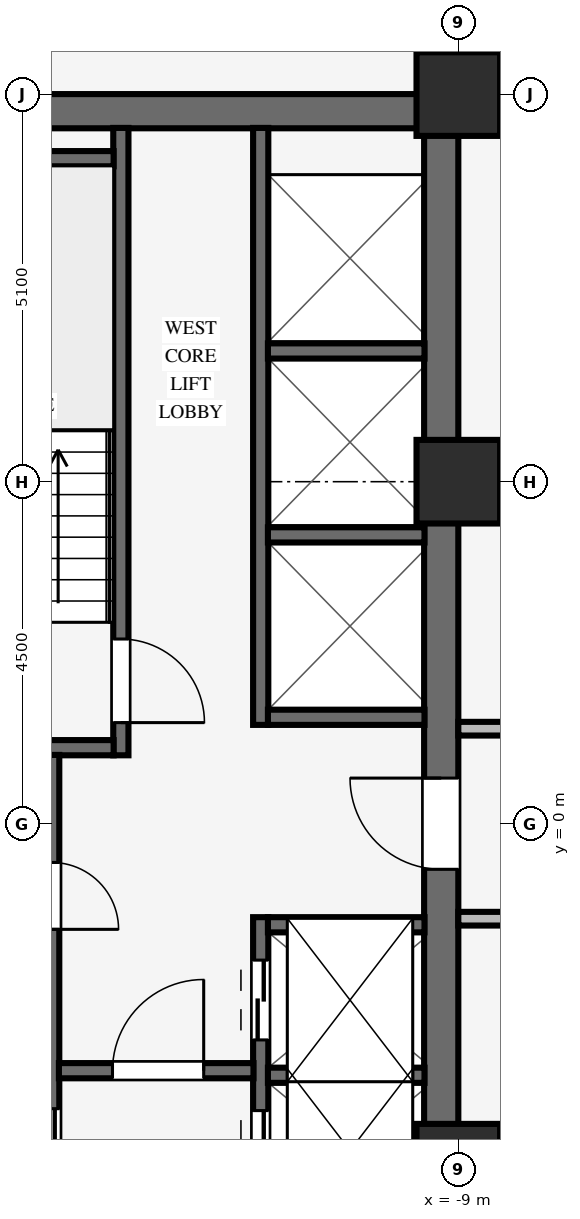
"""IFC4 building model, lengths in metres.
Left out: names, types, materials, properties, quantities, classifications, styles, units other than length and angle.
Written with IfcOpenShell. Run it as: python <this file> out.ifc"""

import sys

from ifc_helpers import new_model, si_unit, direction, frame, frame_2d, origin, origin_2d, place, context, subcontext, project, spatial, rectangle, extrude, source, transform, mapped, element, fill, save


model = new_model("IFC4")
c1 = context("Model", 3, precision=1e-05, world=origin(), true_north=direction((0.0, 1.0)))
c2 = subcontext(c1, "Body", "Model", "MODEL_VIEW")
j1 = project(units=[si_unit("LENGTHUNIT", "METRE"), si_unit("PLANEANGLEUNIT", "RADIAN")], contexts=[c1])
p1 = place(None, origin())
s1 = spatial("IfcSite", under=j1, at=p1, CompositionType="ELEMENT")
p2 = place(p1, origin())
s2 = spatial("IfcBuilding", under=s1, at=p2, CompositionType="ELEMENT")
p3 = place(p2, frame((0.0, 0.0, 86.0)))
s3 = spatial("IfcBuildingStorey", under=s2, at=p3, CompositionType="ELEMENT", Elevation=86.0)
p4 = place(p3, frame((-17.5, 9.375, 0.0), z_axis=(0.0, 0.0, 1.0), x_axis=(1.0, 0.0, 0.0)))
e1 = element("IfcWall", 1, at=p4, inside=s3, PredefinedType="SHEAR", context=c2, shape_type="SweptSolid", body=[
    extrude(rectangle(XDim=8.5, YDim=0.45, at=frame_2d((4.25, 0.0))), origin(), (0.0, 0.0, 1.0), 3.37),
])
p5 = place(p3, frame((-9.225, -9.155, 0.0), z_axis=(0.0, 0.0, 1.0), x_axis=(0.0, 1.0, 0.0)))
e2 = element("IfcWall", 2, at=p5, inside=s3, PredefinedType="SHEAR", context=c2, shape_type="SweptSolid", body=[
    extrude(rectangle(XDim=18.31, YDim=0.45, at=frame_2d((9.155, 0.0))), origin(), (0.0, 0.0, 1.0), 3.37),
])
p6 = place(p5, frame((8.555, 0.0, 0.0)))
e3 = element("IfcOpeningElement", 3, at=p6, cuts=e2, PredefinedType="OPENING", context=c2, shape_type="SweptSolid", body=[
    extrude(rectangle(XDim=1.2, YDim=2.15, at=frame_2d((0.6, 1.075))), frame((0.0, 0.235, 0.0), z_axis=(0.0, -1.0, 0.0), x_axis=(1.0, 0.0, 0.0)), (0.0, 0.0, 1.0), 0.47),
])
for number, where, z_axis, x_axis in (
    (4, (-9.0, -4.5, 0.0), (0.0, 0.0, 1.0), (1.0, 0.0, 0.0)),
    (5, (-9.0, 4.5, 0.0), (0.0, 0.0, 1.0), (1.0, 0.0, 0.0)),
    (6, (-9.0, 9.6, 0.0), (0.0, 0.0, 1.0), (1.0, 0.0, 0.0)),
):
    element("IfcColumn", number, at=place(p3, frame(where, z_axis=z_axis, x_axis=x_axis)), inside=s3, PredefinedType="COLUMN", context=c2, shape_type="SweptSolid", body=[
        extrude(rectangle(XDim=1.1, YDim=1.1, at=origin_2d()), origin(), (0.0, 0.0, 1.0), 3.37),
    ])
p7 = place(p3, frame((-13.44, 0.9, 0.0), z_axis=(0.0, 0.0, 1.0), x_axis=(0.0, 1.0, 0.0)))
e7 = element("IfcWall", 7, at=p7, inside=s3, PredefinedType="SHEAR", context=c2, shape_type="SweptSolid", body=[
    extrude(rectangle(XDim=8.255, YDim=0.2, at=frame_2d((4.127, 0.0))), origin(), (0.0, 0.0, 1.0), 3.37),
])
p8 = place(p7, frame((1.53, 0.0, 0.0), z_axis=(0.0, 0.0, 1.0), x_axis=(-1.0, 0.0, 0.0)))
e8 = element("IfcOpeningElement", 8, at=p8, cuts=e7, PredefinedType="OPENING", context=c2, shape_type="SweptSolid", body=[
    extrude(rectangle(XDim=1.1, YDim=2.15, at=frame_2d((0.55, 1.075))), frame((0.0, 0.11, 0.0), z_axis=(0.0, -1.0, 0.0), x_axis=(1.0, 0.0, 0.0)), (0.0, 0.0, 1.0), 0.22),
])
for number, where, z_axis, x_axis in (
    (9, (-17.055, 1.0, 0.0), (0.0, 0.0, 1.0), (1.0, 0.0, 0.0)),
    (10, (-17.055, 8.75, 0.0), (0.0, 0.0, 1.0), (1.0, 0.0, 0.0)),
):
    element("IfcWall", number, at=place(p3, frame(where, z_axis=z_axis, x_axis=x_axis)), inside=s3, PredefinedType="SHEAR", context=c2, shape_type="SweptSolid", body=[
        extrude(rectangle(XDim=3.52, YDim=0.2, at=frame_2d((1.76, 0.0))), origin(), (0.0, 0.0, 1.0), 3.37),
    ])
p9 = place(p3, frame((-14.35, -6.2, 0.0), z_axis=(0.0, 0.0, 1.0), x_axis=(0.0, 1.0, 0.0)))
e11 = element("IfcWall", 11, at=p9, inside=s3, PredefinedType="SHEAR", context=c2, shape_type="SweptSolid", body=[
    extrude(rectangle(XDim=7.105, YDim=0.2, at=frame_2d((3.552, 0.0))), origin(), (0.0, 0.0, 1.0), 3.37),
])
p10 = place(p9, frame((5.69, 0.0, 0.0), z_axis=(0.0, 0.0, 1.0), x_axis=(-1.0, 0.0, 0.0)))
e12 = element("IfcOpeningElement", 12, at=p10, cuts=e11, PredefinedType="OPENING", context=c2, shape_type="SweptSolid", body=[
    extrude(rectangle(XDim=0.88, YDim=2.1, at=frame_2d((0.44, 1.05))), frame((0.0, 0.11, 0.0), z_axis=(0.0, -1.0, 0.0), x_axis=(1.0, 0.0, 0.0)), (0.0, 0.0, 1.0), 0.22),
])
p11 = place(p9, frame((1.15, 0.0, 0.0)))
e13 = element("IfcOpeningElement", 13, at=p11, cuts=e11, PredefinedType="OPENING", context=c2, shape_type="SweptSolid", body=[
    extrude(rectangle(XDim=1.3, YDim=2.2, at=frame_2d((0.65, 1.1))), frame((0.0, 0.11, 0.0), z_axis=(0.0, -1.0, 0.0), x_axis=(1.0, 0.0, 0.0)), (0.0, 0.0, 1.0), 0.22),
])
p12 = place(p3, frame((-11.6, -9.155, 0.0), z_axis=(0.0, 0.0, 1.0), x_axis=(0.0, 1.0, 0.0)))
e14 = element("IfcWall", 14, at=p12, inside=s3, PredefinedType="SHEAR", context=c2, shape_type="SweptSolid", body=[
    extrude(rectangle(XDim=7.925, YDim=0.2, at=frame_2d((3.962, 0.0))), origin(), (0.0, 0.0, 1.0), 3.37),
])
p13 = place(p12, frame((0.37, 0.0, 0.0)))
e15 = element("IfcOpeningElement", 15, at=p13, cuts=e14, PredefinedType="OPENING", context=c2, shape_type="SweptSolid", body=[
    extrude(rectangle(XDim=1.05, YDim=2.15, at=frame_2d((0.525, 1.075))), frame((0.0, 0.11, 0.0), z_axis=(0.0, -1.0, 0.0), x_axis=(1.0, 0.0, 0.0)), (0.0, 0.0, 1.0), 0.22),
])
p14 = place(p12, frame((2.35, 0.0, 0.0)))
e16 = element("IfcOpeningElement", 16, at=p14, cuts=e14, PredefinedType="OPENING", context=c2, shape_type="SweptSolid", body=[
    extrude(rectangle(XDim=1.05, YDim=2.15, at=frame_2d((0.525, 1.075))), frame((0.0, 0.11, 0.0), z_axis=(0.0, -1.0, 0.0), x_axis=(1.0, 0.0, 0.0)), (0.0, 0.0, 1.0), 0.22),
])
p15 = place(p12, frame((4.33, 0.0, 0.0)))
e17 = element("IfcOpeningElement", 17, at=p15, cuts=e14, PredefinedType="OPENING", context=c2, shape_type="SweptSolid", body=[
    extrude(rectangle(XDim=1.05, YDim=2.15, at=frame_2d((0.525, 1.075))), frame((0.0, 0.11, 0.0), z_axis=(0.0, -1.0, 0.0), x_axis=(1.0, 0.0, 0.0)), (0.0, 0.0, 1.0), 0.22),
])
p16 = place(p12, frame((6.31, 0.0, 0.0)))
e18 = element("IfcOpeningElement", 18, at=p16, cuts=e14, PredefinedType="OPENING", context=c2, shape_type="SweptSolid", body=[
    extrude(rectangle(XDim=1.05, YDim=2.15, at=frame_2d((0.525, 1.075))), frame((0.0, 0.11, 0.0), z_axis=(0.0, -1.0, 0.0), x_axis=(1.0, 0.0, 0.0)), (0.0, 0.0, 1.0), 0.22),
])
p17 = place(p3, frame((-14.255, -3.25, 0.0), z_axis=(0.0, 0.0, 1.0), x_axis=(1.0, 0.0, 0.0)))
e19 = element("IfcWall", 19, at=p17, inside=s3, PredefinedType="SHEAR", context=c2, shape_type="SweptSolid", body=[
    extrude(rectangle(XDim=2.56, YDim=0.2, at=frame_2d((1.28, 0.0))), origin(), (0.0, 0.0, 1.0), 3.37),
])
p18 = place(p17, frame((0.705, 0.0, 0.0)))
e20 = element("IfcOpeningElement", 20, at=p18, cuts=e19, PredefinedType="OPENING", context=c2, shape_type="SweptSolid", body=[
    extrude(rectangle(XDim=1.2, YDim=2.15, at=frame_2d((0.6, 1.075))), frame((0.0, 0.11, 0.0), z_axis=(0.0, -1.0, 0.0), x_axis=(1.0, 0.0, 0.0)), (0.0, 0.0, 1.0), 0.22),
])
for number, where, z_axis, x_axis in (
    (21, (-11.505, -3.31, 0.0), (0.0, 0.0, 1.0), (1.0, 0.0, 0.0)),
    (22, (-11.505, -1.33, 0.0), (0.0, 0.0, 1.0), (1.0, 0.0, 0.0)),
):
    element("IfcWall", number, at=place(p3, frame(where, z_axis=z_axis, x_axis=x_axis)), inside=s3, PredefinedType="SHEAR", context=c2, shape_type="SweptSolid", body=[
        extrude(rectangle(XDim=2.06, YDim=0.2, at=frame_2d((1.03, 0.0))), origin(), (0.0, 0.0, 1.0), 3.37),
    ])
p19 = place(p3, frame((-11.6, 1.3, 0.0), z_axis=(0.0, 0.0, 1.0), x_axis=(0.0, 1.0, 0.0)))
e23 = element("IfcWall", 23, at=p19, inside=s3, PredefinedType="SHEAR", context=c2, shape_type="SweptSolid", body=[
    extrude(rectangle(XDim=7.855, YDim=0.2, at=frame_2d((3.927, 0.0))), origin(), (0.0, 0.0, 1.0), 3.37),
])
for number, where, z_axis, x_axis in (
    (24, (-11.505, 1.4, 0.0), (0.0, 0.0, 1.0), (1.0, 0.0, 0.0)),
    (25, (-11.505, 3.8, 0.0), (0.0, 0.0, 1.0), (1.0, 0.0, 0.0)),
    (26, (-11.505, 6.22, 0.0), (0.0, 0.0, 1.0), (1.0, 0.0, 0.0)),
):
    element("IfcWall", number, at=place(p3, frame(where, z_axis=z_axis, x_axis=x_axis)), inside=s3, PredefinedType="SHEAR", context=c2, shape_type="SweptSolid", body=[
        extrude(rectangle(XDim=2.06, YDim=0.2, at=frame_2d((1.03, 0.0))), origin(), (0.0, 0.0, 1.0), 3.37),
    ])
p20 = place(p3, frame((-9.0, -1.25, 0.0), z_axis=(0.0, 0.0, 1.0), x_axis=(1.0, 0.0, 0.0)))
e27 = element("IfcWall", 27, at=p20, inside=s3, PredefinedType="PARTITIONING", context=c2, shape_type="SweptSolid", body=[
    extrude(rectangle(XDim=5.8, YDim=0.18, at=frame_2d((2.9, 0.0))), origin(), (0.0, 0.0, 1.0), 3.36),
])
p21 = place(p20, frame((2.42, 0.0, 0.0)))
e28 = element("IfcOpeningElement", 28, at=p21, cuts=e27, PredefinedType="OPENING", context=c2, shape_type="SweptSolid", body=[
    extrude(rectangle(XDim=0.96, YDim=2.1, at=frame_2d((0.48, 1.05))), frame((0.0, 0.1, 0.0), z_axis=(0.0, -1.0, 0.0), x_axis=(1.0, 0.0, 0.0)), (0.0, 0.0, 1.0), 0.2),
])
p22 = place(p3, frame((-9.0, 1.25, 0.0), z_axis=(0.0, 0.0, 1.0), x_axis=(1.0, 0.0, 0.0)))
e29 = element("IfcWall", 29, at=p22, inside=s3, PredefinedType="PARTITIONING", context=c2, shape_type="SweptSolid", body=[
    extrude(rectangle(XDim=5.8, YDim=0.18, at=frame_2d((2.9, 0.0))), origin(), (0.0, 0.0, 1.0), 3.36),
])
p23 = place(p3, frame((-8.454, 9.6, 0.0), z_axis=(0.0, 0.0, 1.0), x_axis=(1.0, 0.0, 0.0)))
e30 = element("IfcWall", 30, at=p23, inside=s3, PredefinedType="PARTITIONING", context=c2, shape_type="SweptSolid", body=[
    extrude(rectangle(XDim=5.254, YDim=0.18, at=frame_2d((2.627, 0.0))), origin(), (0.0, 0.0, 1.0), 2.405),
])
m1 = source(origin(), c2, "Body", "SweptSolid", [
    extrude(rectangle(XDim=1.1, YDim=2.15, at=frame_2d((0.55, 1.075))), frame((0.0, 0.025, 0.0), z_axis=(0.0, -1.0, 0.0), x_axis=(1.0, 0.0, 0.0)), (0.0, 0.0, 1.0), 0.05),
])
p24 = place(p8, origin())
e31 = element("IfcDoor", 31, at=p24, inside=s3, OperationType="SINGLE_SWING_RIGHT", PredefinedType="DOOR", context=c2, shape_type="MappedRepresentation", body=[
    mapped(m1, transform((0.0, 0.0, 0.0), scale=1.0)),
])
fill(e8, e31)
m2 = source(origin(), c2, "Body", "SweptSolid", [
    extrude(rectangle(XDim=0.88, YDim=2.1, at=frame_2d((0.44, 1.05))), frame((0.0, 0.025, 0.0), z_axis=(0.0, -1.0, 0.0), x_axis=(1.0, 0.0, 0.0)), (0.0, 0.0, 1.0), 0.05),
])
p25 = place(p10, origin())
e32 = element("IfcDoor", 32, at=p25, inside=s3, OperationType="SINGLE_SWING_RIGHT", PredefinedType="DOOR", context=c2, shape_type="MappedRepresentation", body=[
    mapped(m2, transform((0.0, 0.0, 0.0), scale=1.0)),
])
fill(e12, e32)
m3 = source(origin(), c2, "Body", "SweptSolid", [
    extrude(rectangle(XDim=1.2, YDim=2.15, at=frame_2d((0.6, 1.075))), frame((0.0, 0.025, 0.0), z_axis=(0.0, -1.0, 0.0), x_axis=(1.0, 0.0, 0.0)), (0.0, 0.0, 1.0), 0.05),
])
p26 = place(p18, origin())
e33 = element("IfcDoor", 33, at=p26, inside=s3, OperationType="SINGLE_SWING_RIGHT", PredefinedType="DOOR", context=c2, shape_type="MappedRepresentation", body=[
    mapped(m3, transform((0.0, 0.0, 0.0), scale=1.0)),
])
fill(e20, e33)
p27 = place(p6, origin())
e34 = element("IfcDoor", 34, at=p27, inside=s3, OperationType="SINGLE_SWING_RIGHT", PredefinedType="DOOR", context=c2, shape_type="MappedRepresentation", body=[
    mapped(m3, transform((0.0, 0.0, 0.0), scale=1.0)),
])
fill(e3, e34)
m4 = source(origin(), c2, "Body", "SweptSolid", [
    extrude(rectangle(XDim=1.3, YDim=2.2, at=frame_2d((0.65, 1.1))), frame((0.0, 0.025, 0.0), z_axis=(0.0, -1.0, 0.0), x_axis=(1.0, 0.0, 0.0)), (0.0, 0.0, 1.0), 0.05),
])
p28 = place(p11, origin())
e35 = element("IfcDoor", 35, at=p28, inside=s3, OperationType="DOUBLE_DOOR_SLIDING", PredefinedType="DOOR", context=c2, shape_type="MappedRepresentation", body=[
    mapped(m4, transform((0.0, 0.0, 0.0), scale=1.0)),
])
fill(e13, e35)
m5 = source(origin(), c2, "Body", "SweptSolid", [
    extrude(rectangle(XDim=1.05, YDim=2.15, at=frame_2d((0.525, 1.075))), frame((0.0, 0.025, 0.0), z_axis=(0.0, -1.0, 0.0), x_axis=(1.0, 0.0, 0.0)), (0.0, 0.0, 1.0), 0.05),
])
p29 = place(p15, origin())
e36 = element("IfcDoor", 36, at=p29, inside=s3, OperationType="DOUBLE_DOOR_SLIDING", PredefinedType="DOOR", context=c2, shape_type="MappedRepresentation", body=[
    mapped(m5, transform((0.0, 0.0, 0.0), scale=1.0)),
])
fill(e17, e36)
p30 = place(p16, origin())
e37 = element("IfcDoor", 37, at=p30, inside=s3, OperationType="DOUBLE_DOOR_SLIDING", PredefinedType="DOOR", context=c2, shape_type="MappedRepresentation", body=[
    mapped(m5, transform((0.0, 0.0, 0.0), scale=1.0)),
])
fill(e18, e37)
save(model, sys.argv[1])
